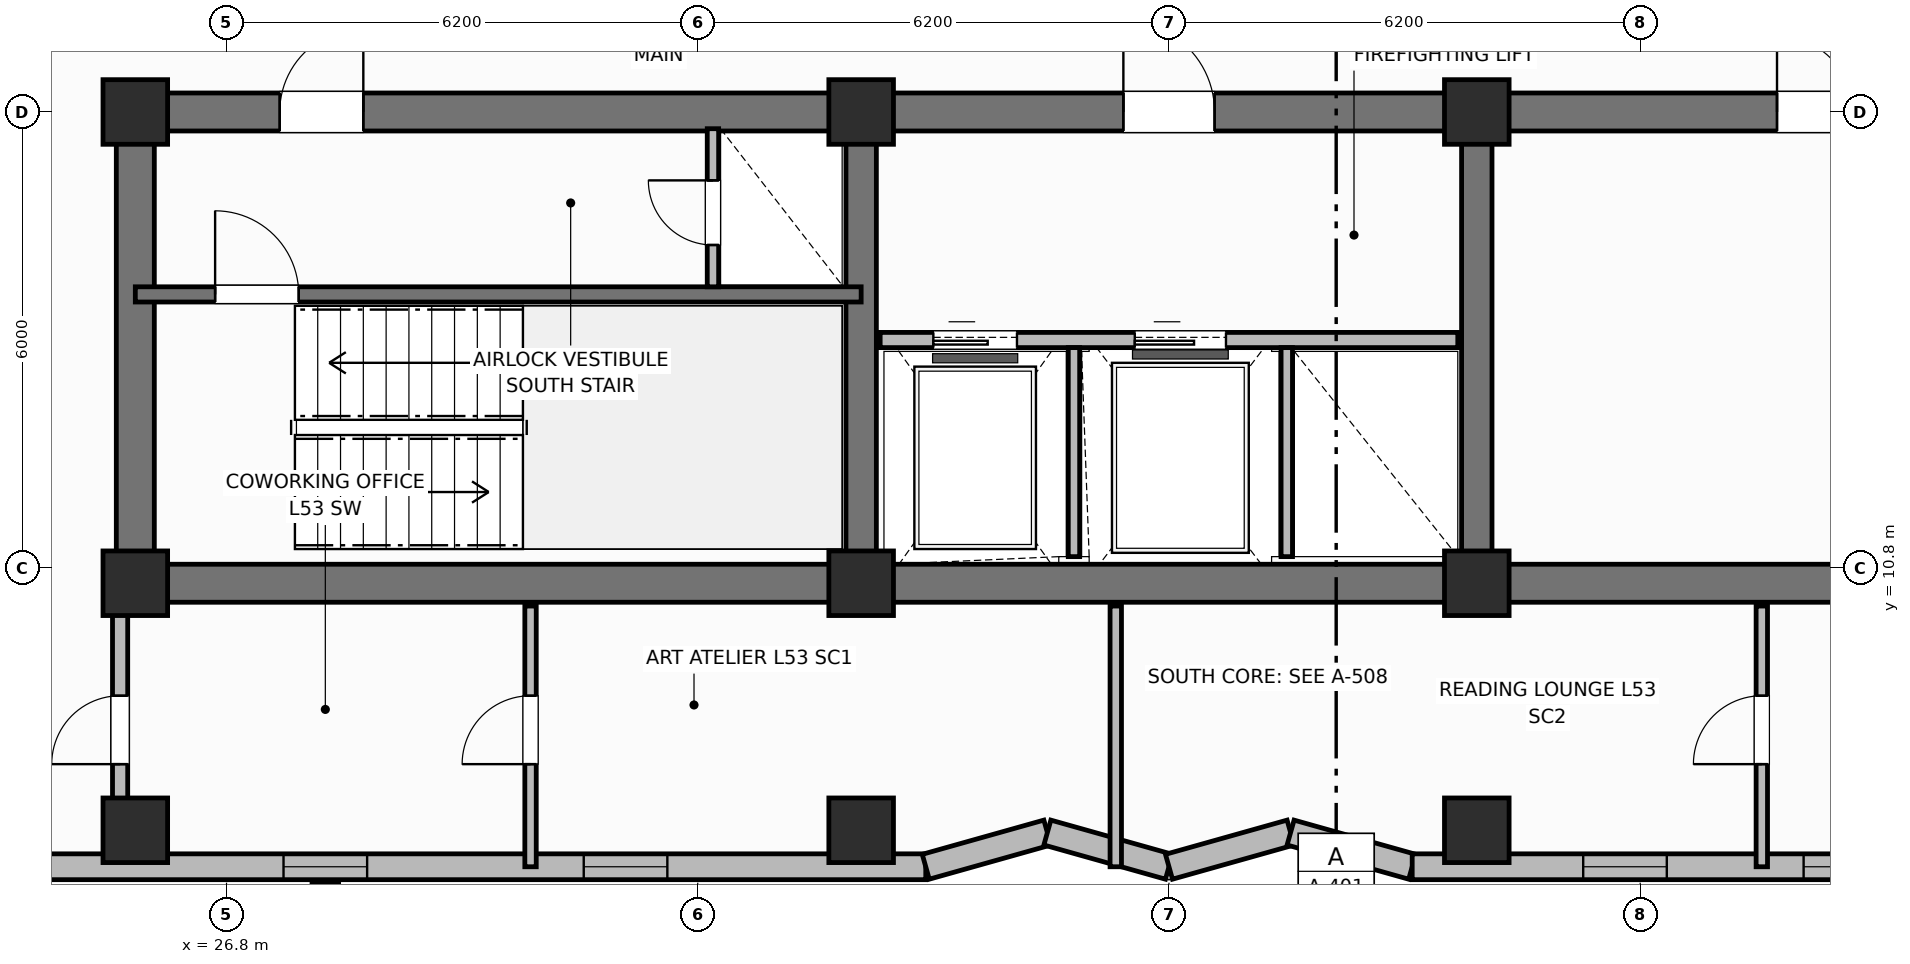
"""IFC4 building model, lengths in metres.
Left out: names, types, materials, properties, quantities, classifications, styles, units other than length and angle.
Written with IfcOpenShell. Run it as: python <this file> out.ifc"""

import sys

from ifc_helpers import new_model, si_unit, direction, frame, frame_2d, origin, origin_2d, place, context, subcontext, project, spatial, rectangle, extrude, element, fill, save


model = new_model("IFC4")
c1 = context("Model", 3, precision=1e-05, world=origin(), true_north=direction((0.0, 1.0)))
c2 = subcontext(c1, "Body", "Model", "MODEL_VIEW")
j1 = project(units=[si_unit("LENGTHUNIT", "METRE"), si_unit("PLANEANGLEUNIT", "RADIAN")], contexts=[c1])
p1 = place(None, origin())
s1 = spatial("IfcSite", under=j1, at=p1, CompositionType="ELEMENT")
p2 = place(p1, origin())
s2 = spatial("IfcBuilding", under=s1, at=p2, CompositionType="ELEMENT")
p3 = place(p2, frame((0.0, 0.0, 214.7)))
s3 = spatial("IfcBuildingStorey", under=s2, at=p3, CompositionType="ELEMENT", Elevation=214.7)
p4 = place(p3, frame((52.8, 10.6, 0.0), z_axis=(0.0, 0.0, 1.0), x_axis=(-1.0, 0.0, 0.0)))
e1 = element("IfcWall", 1, at=p4, inside=s3, PredefinedType="SHEAR", context=c2, shape_type="SweptSolid", body=[
    extrude(rectangle(XDim=27.2, YDim=0.5, at=frame_2d((13.6, 0.0))), origin(), (0.0, 0.0, 1.0), 3.7),
])
p5 = place(p3, frame((25.6, 10.85, 0.0), z_axis=(0.0, 0.0, 1.0), x_axis=(0.0, 1.0, 0.0)))
e2 = element("IfcWall", 2, at=p5, inside=s3, PredefinedType="SHEAR", context=c2, shape_type="SweptSolid", body=[
    extrude(rectangle(XDim=5.7, YDim=0.5, at=frame_2d((2.85, 0.0))), origin(), (0.0, 0.0, 1.0), 3.7),
])
p6 = place(p3, frame((25.6, 16.8, 0.0), z_axis=(0.0, 0.0, 1.0), x_axis=(1.0, 0.0, 0.0)))
e3 = element("IfcWall", 3, at=p6, inside=s3, PredefinedType="SHEAR", context=c2, shape_type="SweptSolid", body=[
    extrude(rectangle(XDim=27.2, YDim=0.5, at=frame_2d((13.6, 0.0))), origin(), (0.0, 0.0, 1.0), 3.7),
])
p7 = place(p6, frame((1.9, 0.0, 0.0)))
e4 = element("IfcOpeningElement", 4, at=p7, cuts=e3, PredefinedType="OPENING", context=c2, shape_type="SweptSolid", body=[
    extrude(rectangle(XDim=1.1, YDim=2.15, at=frame_2d((0.55, 1.075))), frame((0.0, 0.26, 0.0), z_axis=(0.0, -1.0, 0.0), x_axis=(1.0, 0.0, 0.0)), (0.0, 0.0, 1.0), 0.52),
])
p8 = place(p6, frame((13.0, 0.0, 0.0)))
e5 = element("IfcOpeningElement", 5, at=p8, cuts=e3, PredefinedType="OPENING", context=c2, shape_type="SweptSolid", body=[
    extrude(rectangle(XDim=1.2, YDim=2.15, at=frame_2d((0.6, 1.075))), frame((0.0, 0.26, 0.0), z_axis=(0.0, -1.0, 0.0), x_axis=(1.0, 0.0, 0.0)), (0.0, 0.0, 1.0), 0.52),
])
p9 = place(p6, frame((21.6, 0.0, 0.0)))
e6 = element("IfcOpeningElement", 6, at=p9, cuts=e3, PredefinedType="OPENING", context=c2, shape_type="SweptSolid", body=[
    extrude(rectangle(XDim=1.0, YDim=2.15, at=frame_2d((0.5, 1.075))), frame((0.0, 0.26, 0.0), z_axis=(0.0, -1.0, 0.0), x_axis=(1.0, 0.0, 0.0)), (0.0, 0.0, 1.0), 0.52),
])
for number, where, z_axis, x_axis in (
    (7, (35.15, 10.85, 0.0), (0.0, 0.0, 1.0), (0.0, 1.0, 0.0)),
    (8, (43.25, 10.85, 0.0), (0.0, 0.0, 1.0), (0.0, 1.0, 0.0)),
):
    element("IfcWall", number, at=place(p3, frame(where, z_axis=z_axis, x_axis=x_axis)), inside=s3, PredefinedType="SHEAR", context=c2, shape_type="SweptSolid", body=[
        extrude(rectangle(XDim=5.7, YDim=0.4, at=frame_2d((2.85, 0.0))), origin(), (0.0, 0.0, 1.0), 3.7),
    ])
for number, where, z_axis, x_axis in (
    (9, (25.6, 10.6, 0.0), (0.0, 0.0, 1.0), (1.0, 0.0, 0.0)),
    (10, (25.6, 16.8, 0.0), (0.0, 0.0, 1.0), (1.0, 0.0, 0.0)),
    (11, (35.15, 10.6, 0.0), (0.0, 0.0, 1.0), (1.0, 0.0, 0.0)),
    (12, (35.15, 16.8, 0.0), (0.0, 0.0, 1.0), (1.0, 0.0, 0.0)),
    (13, (43.25, 10.6, 0.0), (0.0, 0.0, 1.0), (1.0, 0.0, 0.0)),
    (14, (43.25, 16.8, 0.0), (0.0, 0.0, 1.0), (1.0, 0.0, 0.0)),
    (15, (25.6, 7.35, 0.0), (0.0, 0.0, 1.0), (1.0, 0.0, 0.0)),
    (16, (35.15, 7.35, 0.0), (0.0, 0.0, 1.0), (1.0, 0.0, 0.0)),
    (17, (43.25, 7.35, 0.0), (0.0, 0.0, 1.0), (1.0, 0.0, 0.0)),
):
    element("IfcColumn", number, at=place(p3, frame(where, z_axis=z_axis, x_axis=x_axis)), inside=s3, PredefinedType="COLUMN", context=c2, shape_type="SweptSolid", body=[
        extrude(rectangle(XDim=0.85, YDim=0.85, at=origin_2d()), origin(), (0.0, 0.0, 1.0), 3.7),
    ])
p10 = place(p3, frame((20.2, 6.87, 0.0), z_axis=(0.0, 0.0, 1.0), x_axis=(1.0, 0.0, 0.0)))
e18 = element("IfcWall", 18, at=p10, inside=s3, PredefinedType="SOLIDWALL", context=c2, shape_type="SweptSolid", body=[
    extrude(rectangle(XDim=15.8, YDim=0.34, at=frame_2d((7.9, 0.0))), origin(), (0.0, 0.0, 1.0), 2.72),
])
p11 = place(p10, frame((1.55, 0.0, 0.95)))
e19 = element("IfcOpeningElement", 19, at=p11, cuts=e18, PredefinedType="OPENING", context=c2, shape_type="SweptSolid", body=[
    extrude(rectangle(XDim=1.1, YDim=1.65, at=frame_2d((0.55, 0.825))), frame((0.0, 0.18, 0.0), z_axis=(0.0, -1.0, 0.0), x_axis=(1.0, 0.0, 0.0)), (0.0, 0.0, 1.0), 0.36),
])
p12 = place(p10, frame((7.35, 0.0, 0.95)))
e20 = element("IfcOpeningElement", 20, at=p12, cuts=e18, PredefinedType="OPENING", context=c2, shape_type="SweptSolid", body=[
    extrude(rectangle(XDim=1.1, YDim=1.65, at=frame_2d((0.55, 0.825))), frame((0.0, 0.18, 0.0), z_axis=(0.0, -1.0, 0.0), x_axis=(1.0, 0.0, 0.0)), (0.0, 0.0, 1.0), 0.36),
])
p13 = place(p10, frame((11.3, 0.0, 0.95)))
e21 = element("IfcOpeningElement", 21, at=p13, cuts=e18, PredefinedType="OPENING", context=c2, shape_type="SweptSolid", body=[
    extrude(rectangle(XDim=1.1, YDim=1.65, at=frame_2d((0.55, 0.825))), frame((0.0, 0.18, 0.0), z_axis=(0.0, -1.0, 0.0), x_axis=(1.0, 0.0, 0.0)), (0.0, 0.0, 1.0), 0.36),
])
p14 = place(p3, frame((36.0, 6.87, 0.0), z_axis=(0.0, 0.0, 1.0), x_axis=(0.962662902433, 0.270703040766, 0.0)))
e22 = element("IfcWall", 22, at=p14, inside=s3, PredefinedType="SOLIDWALL", context=c2, shape_type="SweptSolid", body=[
    extrude(rectangle(XDim=1.662, YDim=0.34, at=frame_2d((0.831, 0.0))), origin(), (0.0, 0.0, 1.0), 2.72),
])
p15 = place(p3, frame((37.6, 7.32, 0.0), z_axis=(0.0, 0.0, 1.0), x_axis=(0.962652136636, -0.270741322725, 0.0)))
e23 = element("IfcWall", 23, at=p15, inside=s3, PredefinedType="SOLIDWALL", context=c2, shape_type="SweptSolid", body=[
    extrude(rectangle(XDim=1.662, YDim=0.34, at=frame_2d((0.831, 0.0))), origin(), (0.0, 0.0, 1.0), 2.72),
])
p16 = place(p3, frame((39.2, 6.87, 0.0), z_axis=(0.0, 0.0, 1.0), x_axis=(0.962662902433, 0.270703040766, 0.0)))
e24 = element("IfcWall", 24, at=p16, inside=s3, PredefinedType="SOLIDWALL", context=c2, shape_type="SweptSolid", body=[
    extrude(rectangle(XDim=1.662, YDim=0.34, at=frame_2d((0.831, 0.0))), origin(), (0.0, 0.0, 1.0), 2.72),
])
p17 = place(p3, frame((40.8, 7.32, 0.0), z_axis=(0.0, 0.0, 1.0), x_axis=(0.962652136636, -0.270741322725, 0.0)))
e25 = element("IfcWall", 25, at=p17, inside=s3, PredefinedType="SOLIDWALL", context=c2, shape_type="SweptSolid", body=[
    extrude(rectangle(XDim=1.662, YDim=0.34, at=frame_2d((0.831, 0.0))), origin(), (0.0, 0.0, 1.0), 2.72),
])
p18 = place(p3, frame((42.4, 6.87, 0.0), z_axis=(0.0, 0.0, 1.0), x_axis=(1.0, 0.0, 0.0)))
e26 = element("IfcWall", 26, at=p18, inside=s3, PredefinedType="SOLIDWALL", context=c2, shape_type="SweptSolid", body=[
    extrude(rectangle(XDim=15.8, YDim=0.34, at=frame_2d((7.9, 0.0))), origin(), (0.0, 0.0, 1.0), 2.72),
])
p19 = place(p18, frame((2.25, 0.0, 0.95)))
e27 = element("IfcOpeningElement", 27, at=p19, cuts=e26, PredefinedType="OPENING", context=c2, shape_type="SweptSolid", body=[
    extrude(rectangle(XDim=1.1, YDim=1.65, at=frame_2d((0.55, 0.825))), frame((0.0, 0.18, 0.0), z_axis=(0.0, -1.0, 0.0), x_axis=(1.0, 0.0, 0.0)), (0.0, 0.0, 1.0), 0.36),
])
p20 = place(p18, frame((5.15, 0.0, 0.95)))
e28 = element("IfcOpeningElement", 28, at=p20, cuts=e26, PredefinedType="OPENING", context=c2, shape_type="SweptSolid", body=[
    extrude(rectangle(XDim=1.1, YDim=1.65, at=frame_2d((0.55, 0.825))), frame((0.0, 0.18, 0.0), z_axis=(0.0, -1.0, 0.0), x_axis=(1.0, 0.0, 0.0)), (0.0, 0.0, 1.0), 0.36),
])
p21 = place(p18, frame((7.35, 0.0, 0.95)))
e29 = element("IfcOpeningElement", 29, at=p21, cuts=e26, PredefinedType="OPENING", context=c2, shape_type="SweptSolid", body=[
    extrude(rectangle(XDim=1.1, YDim=1.65, at=frame_2d((0.55, 0.825))), frame((0.0, 0.18, 0.0), z_axis=(0.0, -1.0, 0.0), x_axis=(1.0, 0.0, 0.0)), (0.0, 0.0, 1.0), 0.36),
])
p22 = place(p18, frame((13.15, 0.0, 0.95)))
e30 = element("IfcOpeningElement", 30, at=p22, cuts=e26, PredefinedType="OPENING", context=c2, shape_type="SweptSolid", body=[
    extrude(rectangle(XDim=1.1, YDim=1.65, at=frame_2d((0.55, 0.825))), frame((0.0, 0.18, 0.0), z_axis=(0.0, -1.0, 0.0), x_axis=(1.0, 0.0, 0.0)), (0.0, 0.0, 1.0), 0.36),
])
p23 = place(p3, frame((25.6, 14.4, 0.0), z_axis=(0.0, 0.0, 1.0), x_axis=(1.0, 0.0, 0.0)))
e31 = element("IfcWall", 31, at=p23, inside=s3, PredefinedType="SHEAR", context=c2, shape_type="SweptSolid", body=[
    extrude(rectangle(XDim=9.55, YDim=0.2, at=frame_2d((4.775, 0.0))), origin(), (0.0, 0.0, 1.0), 3.7),
])
p24 = place(p23, frame((1.05, 0.0, 0.0)))
e32 = element("IfcOpeningElement", 32, at=p24, cuts=e31, PredefinedType="OPENING", context=c2, shape_type="SweptSolid", body=[
    extrude(rectangle(XDim=1.1, YDim=2.15, at=frame_2d((0.55, 1.075))), frame((0.0, 0.11, 0.0), z_axis=(0.0, -1.0, 0.0), x_axis=(1.0, 0.0, 0.0)), (0.0, 0.0, 1.0), 0.22),
])
p25 = place(p3, frame((33.2, 14.5, 0.0), z_axis=(0.0, 0.0, 1.0), x_axis=(0.0, 1.0, 0.0)))
e33 = element("IfcWall", 33, at=p25, inside=s3, PredefinedType="PARTITIONING", context=c2, shape_type="SweptSolid", body=[
    extrude(rectangle(XDim=2.08, YDim=0.15, at=frame_2d((1.04, 0.0))), origin(), (0.0, 0.0, 1.0), 2.55),
])
p26 = place(p25, frame((0.55, 0.0, 0.0)))
e34 = element("IfcOpeningElement", 34, at=p26, cuts=e33, PredefinedType="OPENING", context=c2, shape_type="SweptSolid", body=[
    extrude(rectangle(XDim=0.85, YDim=2.05, at=frame_2d((0.425, 1.025))), frame((0.0, 0.085, 0.0), z_axis=(0.0, -1.0, 0.0), x_axis=(1.0, 0.0, 0.0)), (0.0, 0.0, 1.0), 0.17),
])
p27 = place(p3, frame((35.4, 13.8, 0.0), z_axis=(0.0, 0.0, 1.0), x_axis=(1.0, 0.0, 0.0)))
e35 = element("IfcWall", 35, at=p27, inside=s3, PredefinedType="PARTITIONING", context=c2, shape_type="SweptSolid", body=[
    extrude(rectangle(XDim=7.6, YDim=0.2, at=frame_2d((3.8, 0.0))), origin(), (0.0, 0.0, 1.0), 2.32),
])
p28 = place(p27, frame((0.7, 0.0, 0.0)))
e36 = element("IfcOpeningElement", 36, at=p28, cuts=e35, PredefinedType="OPENING", context=c2, shape_type="SweptSolid", body=[
    extrude(rectangle(XDim=1.1, YDim=2.15, at=frame_2d((0.55, 1.075))), frame((0.0, 0.11, 0.0), z_axis=(0.0, -1.0, 0.0), x_axis=(1.0, 0.0, 0.0)), (0.0, 0.0, 1.0), 0.22),
])
p29 = place(p27, frame((3.35, 0.0, 0.0)))
e37 = element("IfcOpeningElement", 37, at=p29, cuts=e35, PredefinedType="OPENING", context=c2, shape_type="SweptSolid", body=[
    extrude(rectangle(XDim=1.2, YDim=2.15, at=frame_2d((0.6, 1.075))), frame((0.0, 0.11, 0.0), z_axis=(0.0, -1.0, 0.0), x_axis=(1.0, 0.0, 0.0)), (0.0, 0.0, 1.0), 0.22),
])
for number, where, z_axis, x_axis in (
    (38, (37.95, 10.95, 0.0), (0.0, 0.0, 1.0), (0.0, 1.0, 0.0)),
    (39, (40.75, 10.95, 0.0), (0.0, 0.0, 1.0), (0.0, 1.0, 0.0)),
):
    element("IfcWall", number, at=place(p3, frame(where, z_axis=z_axis, x_axis=x_axis)), inside=s3, PredefinedType="PARTITIONING", context=c2, shape_type="SweptSolid", body=[
        extrude(rectangle(XDim=2.75, YDim=0.15, at=frame_2d((1.375, 0.0))), origin(), (0.0, 0.0, 1.0), 2.55),
    ])
p30 = place(p3, frame((30.8, 6.87, 0.0), z_axis=(0.0, 0.0, 1.0), x_axis=(0.0, 1.0, 0.0)))
e40 = element("IfcWall", 40, at=p30, inside=s3, PredefinedType="PARTITIONING", context=c2, shape_type="SweptSolid", body=[
    extrude(rectangle(XDim=3.43, YDim=0.15, at=frame_2d((1.715, 0.0))), origin(), (0.0, 0.0, 1.0), 2.55),
])
p31 = place(p30, frame((1.35, 0.0, 0.0)))
e41 = element("IfcOpeningElement", 41, at=p31, cuts=e40, PredefinedType="OPENING", context=c2, shape_type="SweptSolid", body=[
    extrude(rectangle(XDim=0.9, YDim=2.1, at=frame_2d((0.45, 1.05))), frame((0.0, 0.085, 0.0), z_axis=(0.0, -1.0, 0.0), x_axis=(1.0, 0.0, 0.0)), (0.0, 0.0, 1.0), 0.17),
])
p32 = place(p3, frame((38.5, 6.87, 0.0), z_axis=(0.0, 0.0, 1.0), x_axis=(0.0, 1.0, 0.0)))
e42 = element("IfcWall", 42, at=p32, inside=s3, PredefinedType="PARTITIONING", context=c2, shape_type="SweptSolid", body=[
    extrude(rectangle(XDim=3.43, YDim=0.15, at=frame_2d((1.715, 0.0))), origin(), (0.0, 0.0, 1.0), 2.55),
])
p33 = place(p3, frame((47.0, 6.87, 0.0), z_axis=(0.0, 0.0, 1.0), x_axis=(0.0, 1.0, 0.0)))
e43 = element("IfcWall", 43, at=p33, inside=s3, PredefinedType="PARTITIONING", context=c2, shape_type="SweptSolid", body=[
    extrude(rectangle(XDim=3.43, YDim=0.15, at=frame_2d((1.715, 0.0))), origin(), (0.0, 0.0, 1.0), 2.55),
])
p34 = place(p33, frame((1.35, 0.0, 0.0)))
e44 = element("IfcOpeningElement", 44, at=p34, cuts=e43, PredefinedType="OPENING", context=c2, shape_type="SweptSolid", body=[
    extrude(rectangle(XDim=0.9, YDim=2.1, at=frame_2d((0.45, 1.05))), frame((0.0, 0.085, 0.0), z_axis=(0.0, -1.0, 0.0), x_axis=(1.0, 0.0, 0.0)), (0.0, 0.0, 1.0), 0.17),
])
p35 = place(p3, frame((25.4, 7.57, 0.0), z_axis=(0.0, 0.0, 1.0), x_axis=(0.0, 1.0, 0.0)))
e45 = element("IfcWall", 45, at=p35, inside=s3, PredefinedType="PARTITIONING", context=c2, shape_type="SweptSolid", body=[
    extrude(rectangle(XDim=2.73, YDim=0.2, at=frame_2d((1.365, 0.0))), origin(), (0.0, 0.0, 1.0), 2.55),
])
p36 = place(p35, frame((0.65, 0.0, 0.0)))
e46 = element("IfcOpeningElement", 46, at=p36, cuts=e45, PredefinedType="OPENING", context=c2, shape_type="SweptSolid", body=[
    extrude(rectangle(XDim=0.9, YDim=2.1, at=frame_2d((0.45, 1.05))), frame((0.0, 0.11, 0.0), z_axis=(0.0, -1.0, 0.0), x_axis=(1.0, 0.0, 0.0)), (0.0, 0.0, 1.0), 0.22),
])
p37 = place(p12, origin())
e47 = element("IfcWindow", 47, at=p37, inside=s3, PartitioningType="SINGLE_PANEL", PredefinedType="WINDOW", context=c2, shape_type="SweptSolid", body=[
    extrude(rectangle(XDim=1.1, YDim=1.65, at=frame_2d((0.55, 0.825))), frame((0.0, 0.03, 0.0), z_axis=(0.0, -1.0, 0.0), x_axis=(1.0, 0.0, 0.0)), (0.0, 0.0, 1.0), 0.06),
])
fill(e20, e47)
p38 = place(p13, origin())
e48 = element("IfcWindow", 48, at=p38, inside=s3, PartitioningType="SINGLE_PANEL", PredefinedType="WINDOW", context=c2, shape_type="SweptSolid", body=[
    extrude(rectangle(XDim=1.1, YDim=1.65, at=frame_2d((0.55, 0.825))), frame((0.0, 0.03, 0.0), z_axis=(0.0, -1.0, 0.0), x_axis=(1.0, 0.0, 0.0)), (0.0, 0.0, 1.0), 0.06),
])
fill(e21, e48)
p39 = place(p19, origin())
e49 = element("IfcWindow", 49, at=p39, inside=s3, PartitioningType="SINGLE_PANEL", PredefinedType="WINDOW", context=c2, shape_type="SweptSolid", body=[
    extrude(rectangle(XDim=1.1, YDim=1.65, at=frame_2d((0.55, 0.825))), frame((0.0, 0.03, 0.0), z_axis=(0.0, -1.0, 0.0), x_axis=(1.0, 0.0, 0.0)), (0.0, 0.0, 1.0), 0.06),
])
fill(e27, e49)
p40 = place(p20, origin())
e50 = element("IfcWindow", 50, at=p40, inside=s3, PartitioningType="SINGLE_PANEL", PredefinedType="WINDOW", context=c2, shape_type="SweptSolid", body=[
    extrude(rectangle(XDim=1.1, YDim=1.65, at=frame_2d((0.55, 0.825))), frame((0.0, 0.03, 0.0), z_axis=(0.0, -1.0, 0.0), x_axis=(1.0, 0.0, 0.0)), (0.0, 0.0, 1.0), 0.06),
])
fill(e28, e50)
p41 = place(p24, origin())
e51 = element("IfcDoor", 51, at=p41, inside=s3, OperationType="SINGLE_SWING_LEFT", PredefinedType="DOOR", context=c2, shape_type="SweptSolid", body=[
    extrude(rectangle(XDim=1.1, YDim=2.15, at=frame_2d((0.55, 1.075))), frame((0.0, 0.025, 0.0), z_axis=(0.0, -1.0, 0.0), x_axis=(1.0, 0.0, 0.0)), (0.0, 0.0, 1.0), 0.05),
])
fill(e32, e51)
p42 = place(p26, origin())
e52 = element("IfcDoor", 52, at=p42, inside=s3, OperationType="SINGLE_SWING_RIGHT", PredefinedType="TRAPDOOR", context=c2, shape_type="SweptSolid", body=[
    extrude(rectangle(XDim=0.85, YDim=2.05, at=frame_2d((0.425, 1.025))), frame((0.0, 0.025, 0.0), z_axis=(0.0, -1.0, 0.0), x_axis=(1.0, 0.0, 0.0)), (0.0, 0.0, 1.0), 0.05),
])
fill(e34, e52)
p43 = place(p28, origin())
e53 = element("IfcDoor", 53, at=p43, inside=s3, OperationType="SLIDING_TO_LEFT", PredefinedType="DOOR", context=c2, shape_type="SweptSolid", body=[
    extrude(rectangle(XDim=1.1, YDim=2.15, at=frame_2d((0.55, 1.075))), frame((0.0, 0.025, 0.0), z_axis=(0.0, -1.0, 0.0), x_axis=(1.0, 0.0, 0.0)), (0.0, 0.0, 1.0), 0.05),
])
fill(e36, e53)
p44 = place(p29, origin())
e54 = element("IfcDoor", 54, at=p44, inside=s3, OperationType="SLIDING_TO_LEFT", PredefinedType="DOOR", context=c2, shape_type="SweptSolid", body=[
    extrude(rectangle(XDim=1.2, YDim=2.15, at=frame_2d((0.6, 1.075))), frame((0.0, 0.025, 0.0), z_axis=(0.0, -1.0, 0.0), x_axis=(1.0, 0.0, 0.0)), (0.0, 0.0, 1.0), 0.05),
])
fill(e37, e54)
p45 = place(p31, origin())
e55 = element("IfcDoor", 55, at=p45, inside=s3, OperationType="SINGLE_SWING_LEFT", PredefinedType="DOOR", context=c2, shape_type="SweptSolid", body=[
    extrude(rectangle(XDim=0.9, YDim=2.1, at=frame_2d((0.45, 1.05))), frame((0.0, 0.025, 0.0), z_axis=(0.0, -1.0, 0.0), x_axis=(1.0, 0.0, 0.0)), (0.0, 0.0, 1.0), 0.05),
])
fill(e41, e55)
p46 = place(p34, origin())
e56 = element("IfcDoor", 56, at=p46, inside=s3, OperationType="SINGLE_SWING_LEFT", PredefinedType="DOOR", context=c2, shape_type="SweptSolid", body=[
    extrude(rectangle(XDim=0.9, YDim=2.1, at=frame_2d((0.45, 1.05))), frame((0.0, 0.025, 0.0), z_axis=(0.0, -1.0, 0.0), x_axis=(1.0, 0.0, 0.0)), (0.0, 0.0, 1.0), 0.05),
])
fill(e44, e56)
p47 = place(p36, origin())
e57 = element("IfcDoor", 57, at=p47, inside=s3, OperationType="SINGLE_SWING_LEFT", PredefinedType="DOOR", context=c2, shape_type="SweptSolid", body=[
    extrude(rectangle(XDim=0.9, YDim=2.1, at=frame_2d((0.45, 1.05))), frame((0.0, 0.025, 0.0), z_axis=(0.0, -1.0, 0.0), x_axis=(1.0, 0.0, 0.0)), (0.0, 0.0, 1.0), 0.05),
])
fill(e46, e57)
p48 = place(p7, origin())
e58 = element("IfcDoor", 58, at=p48, inside=s3, OperationType="SINGLE_SWING_RIGHT", PredefinedType="DOOR", context=c2, shape_type="SweptSolid", body=[
    extrude(rectangle(XDim=1.1, YDim=2.15, at=frame_2d((0.55, 1.075))), frame((0.0, 0.025, 0.0), z_axis=(0.0, -1.0, 0.0), x_axis=(1.0, 0.0, 0.0)), (0.0, 0.0, 1.0), 0.05),
])
fill(e4, e58)
p49 = place(p8, origin())
e59 = element("IfcDoor", 59, at=p49, inside=s3, OperationType="SINGLE_SWING_LEFT", PredefinedType="DOOR", context=c2, shape_type="SweptSolid", body=[
    extrude(rectangle(XDim=1.2, YDim=2.15, at=frame_2d((0.6, 1.075))), frame((0.0, 0.025, 0.0), z_axis=(0.0, -1.0, 0.0), x_axis=(1.0, 0.0, 0.0)), (0.0, 0.0, 1.0), 0.05),
])
fill(e5, e59)
p50 = place(p9, origin())
e60 = element("IfcDoor", 60, at=p50, inside=s3, OperationType="SINGLE_SWING_LEFT", PredefinedType="DOOR", context=c2, shape_type="SweptSolid", body=[
    extrude(rectangle(XDim=1.0, YDim=2.15, at=frame_2d((0.5, 1.075))), frame((0.0, 0.025, 0.0), z_axis=(0.0, -1.0, 0.0), x_axis=(1.0, 0.0, 0.0)), (0.0, 0.0, 1.0), 0.05),
])
fill(e6, e60)
save(model, sys.argv[1])
